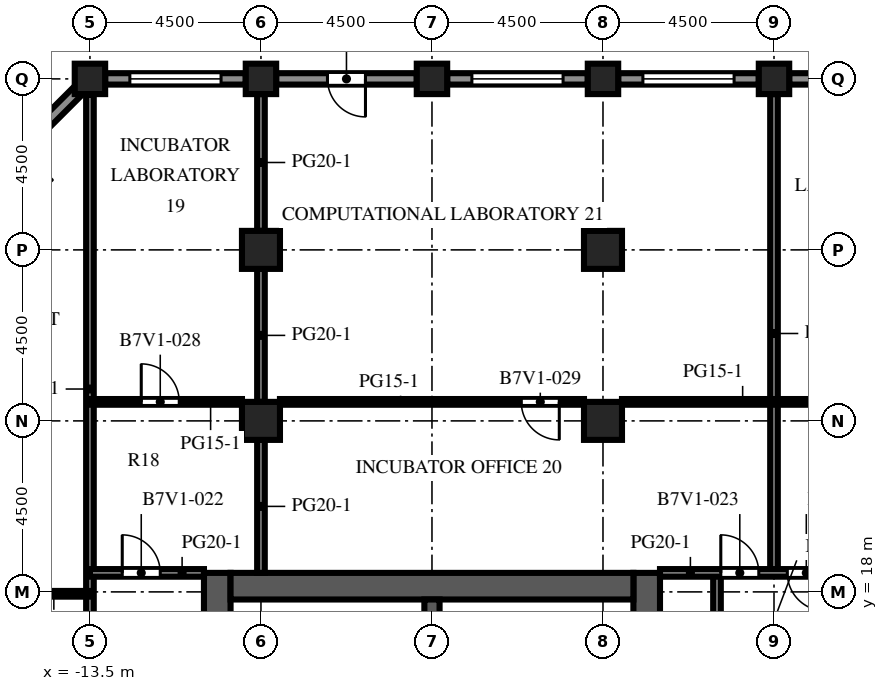
"""IFC4 building model, lengths in metres.
Left out: names, types, materials, properties, quantities, classifications, styles, units other than length and angle.
Written with IfcOpenShell. Run it as: python <this file> out.ifc"""

import sys

from ifc_helpers import new_model, si_unit, direction, frame, frame_2d, origin, origin_2d, place, context, subcontext, project, spatial, rectangle, extrude, element, fill, save


model = new_model("IFC4")
c1 = context("Model", 3, precision=1e-05, world=origin(), true_north=direction((0.0, 1.0)))
c2 = subcontext(c1, "Body", "Model", "MODEL_VIEW")
j1 = project(units=[si_unit("LENGTHUNIT", "METRE"), si_unit("PLANEANGLEUNIT", "RADIAN")], contexts=[c1])
p1 = place(None, origin())
s1 = spatial("IfcSite", under=j1, at=p1, CompositionType="ELEMENT")
p2 = place(p1, origin())
s2 = spatial("IfcBuilding", under=s1, at=p2, CompositionType="ELEMENT")
p3 = place(p2, frame((0.0, 0.0, 252.1)))
s3 = spatial("IfcBuildingStorey", under=s2, at=p3, CompositionType="ELEMENT", Elevation=252.1)
for number, where, z_axis, x_axis in (
    (1, (-13.5, 31.5, 0.0), (0.0, 0.0, 1.0), (1.0, 0.0, 0.0)),
    (2, (-9.0, 31.5, 0.0), (0.0, 0.0, 1.0), (1.0, 0.0, 0.0)),
    (3, (-4.5, 31.5, 0.0), (0.0, 0.0, 1.0), (1.0, 0.0, 0.0)),
    (4, (0.0, 31.5, 0.0), (0.0, 0.0, 1.0), (1.0, 0.0, 0.0)),
    (5, (4.5, 31.5, 0.0), (0.0, 0.0, 1.0), (1.0, 0.0, 0.0)),
):
    element("IfcColumn", number, at=place(p3, frame(where, z_axis=z_axis, x_axis=x_axis)), inside=s3, PredefinedType="COLUMN", context=c2, shape_type="SweptSolid", body=[
        extrude(rectangle(XDim=0.8, YDim=0.8, at=origin_2d()), origin(), (0.0, 0.0, 1.0), 4.1),
    ])
for number, where, z_axis, x_axis in (
    (6, (-9.0, 22.5, 0.0), (0.0, 0.0, 1.0), (1.0, 0.0, 0.0)),
    (7, (-9.0, 27.0, 0.0), (0.0, 0.0, 1.0), (1.0, 0.0, 0.0)),
    (8, (0.0, 22.5, 0.0), (0.0, 0.0, 1.0), (1.0, 0.0, 0.0)),
    (9, (0.0, 27.0, 0.0), (0.0, 0.0, 1.0), (1.0, 0.0, 0.0)),
):
    element("IfcColumn", number, at=place(p3, frame(where, z_axis=z_axis, x_axis=x_axis)), inside=s3, PredefinedType="COLUMN", context=c2, shape_type="SweptSolid", body=[
        extrude(rectangle(XDim=1.0, YDim=1.0, at=origin_2d()), origin(), (0.0, 0.0, 1.0), 4.1),
    ])
p4 = place(p3, frame((-10.15, -9.0, 0.0), z_axis=(0.0, 0.0, 1.0), x_axis=(0.0, 1.0, 0.0)))
e10 = element("IfcWall", 10, at=p4, inside=s3, PredefinedType="SHEAR", context=c2, shape_type="SweptSolid", body=[
    extrude(rectangle(XDim=27.5, YDim=0.7, at=frame_2d((13.75, 0.0))), origin(), (0.0, 0.0, 1.0), 4.1),
])
p5 = place(p4, frame((12.55, 0.0, 0.0)))
e11 = element("IfcOpeningElement", 11, at=p5, cuts=e10, PredefinedType="OPENING", context=c2, shape_type="SweptSolid", body=[
    extrude(rectangle(XDim=2.4, YDim=2.4, at=frame_2d((1.2, 1.2))), frame((0.0, 0.36, 0.0), z_axis=(0.0, -1.0, 0.0), x_axis=(1.0, 0.0, 0.0)), (0.0, 0.0, 1.0), 0.72),
])
p6 = place(p4, frame((6.825, 0.0, 0.0)))
e12 = element("IfcOpeningElement", 12, at=p6, cuts=e10, PredefinedType="OPENING", context=c2, shape_type="SweptSolid", body=[
    extrude(rectangle(XDim=1.2, YDim=2.1, at=frame_2d((0.6, 1.05))), frame((0.0, 0.36, 0.0), z_axis=(0.0, -1.0, 0.0), x_axis=(1.0, 0.0, 0.0)), (0.0, 0.0, 1.0), 0.72),
])
p7 = place(p4, frame((19.475, 0.0, 0.0)))
e13 = element("IfcOpeningElement", 13, at=p7, cuts=e10, PredefinedType="OPENING", context=c2, shape_type="SweptSolid", body=[
    extrude(rectangle(XDim=1.2, YDim=2.1, at=frame_2d((0.6, 1.05))), frame((0.0, 0.36, 0.0), z_axis=(0.0, -1.0, 0.0), x_axis=(1.0, 0.0, 0.0)), (0.0, 0.0, 1.0), 0.72),
])
p8 = place(p3, frame((1.15, -9.0, 0.0), z_axis=(0.0, 0.0, 1.0), x_axis=(0.0, 1.0, 0.0)))
e14 = element("IfcWall", 14, at=p8, inside=s3, PredefinedType="SHEAR", context=c2, shape_type="SweptSolid", body=[
    extrude(rectangle(XDim=27.5, YDim=0.7, at=frame_2d((13.75, 0.0))), origin(), (0.0, 0.0, 1.0), 4.1),
])
p9 = place(p8, frame((12.55, 0.0, 0.0)))
e15 = element("IfcOpeningElement", 15, at=p9, cuts=e14, PredefinedType="OPENING", context=c2, shape_type="SweptSolid", body=[
    extrude(rectangle(XDim=2.4, YDim=2.4, at=frame_2d((1.2, 1.2))), frame((0.0, 0.36, 0.0), z_axis=(0.0, -1.0, 0.0), x_axis=(1.0, 0.0, 0.0)), (0.0, 0.0, 1.0), 0.72),
])
p10 = place(p8, frame((3.9, 0.0, 0.0)))
e16 = element("IfcOpeningElement", 16, at=p10, cuts=e14, PredefinedType="OPENING", context=c2, shape_type="SweptSolid", body=[
    extrude(rectangle(XDim=1.2, YDim=2.1, at=frame_2d((0.6, 1.05))), frame((0.0, 0.36, 0.0), z_axis=(0.0, -1.0, 0.0), x_axis=(1.0, 0.0, 0.0)), (0.0, 0.0, 1.0), 0.72),
])
p11 = place(p8, frame((22.4, 0.0, 0.0)))
e17 = element("IfcOpeningElement", 17, at=p11, cuts=e14, PredefinedType="OPENING", context=c2, shape_type="SweptSolid", body=[
    extrude(rectangle(XDim=1.2, YDim=2.1, at=frame_2d((0.6, 1.05))), frame((0.0, 0.36, 0.0), z_axis=(0.0, -1.0, 0.0), x_axis=(1.0, 0.0, 0.0)), (0.0, 0.0, 1.0), 0.72),
])
p12 = place(p3, frame((-9.8, 18.15, 0.0), z_axis=(0.0, 0.0, 1.0), x_axis=(1.0, 0.0, 0.0)))
e18 = element("IfcWall", 18, at=p12, inside=s3, PredefinedType="SHEAR", context=c2, shape_type="SweptSolid", body=[
    extrude(rectangle(XDim=10.6, YDim=0.7, at=frame_2d((5.3, 0.0))), origin(), (0.0, 0.0, 1.0), 4.1),
])
p13 = place(p3, frame((-4.5, 10.2, 0.0), z_axis=(0.0, 0.0, 1.0), x_axis=(0.0, 1.0, 0.0)))
e19 = element("IfcWall", 19, at=p13, inside=s3, PredefinedType="SHEAR", context=c2, shape_type="SweptSolid", body=[
    extrude(rectangle(XDim=7.6, YDim=0.4, at=frame_2d((3.8, 0.0))), origin(), (0.0, 0.0, 1.0), 4.1),
])
p14 = place(p3, frame((4.9, 31.5, 0.0), z_axis=(0.0, 0.0, 1.0), x_axis=(1.0, 0.0, 0.0)))
e20 = element("IfcWall", 20, at=p14, inside=s3, PredefinedType="SOLIDWALL", context=c2, shape_type="SweptSolid", body=[
    extrude(rectangle(XDim=3.7, YDim=0.3, at=frame_2d((1.85, 0.0))), origin(), (0.0, 0.0, 1.0), 2.85),
])
p15 = place(p14, frame((0.65, 0.0, 0.8)))
e21 = element("IfcOpeningElement", 21, at=p15, cuts=e20, PredefinedType="OPENING", context=c2, shape_type="SweptSolid", body=[
    extrude(rectangle(XDim=2.4, YDim=1.7, at=frame_2d((1.2, 0.85))), frame((0.0, 0.16, 0.0), z_axis=(0.0, -1.0, 0.0), x_axis=(1.0, 0.0, 0.0)), (0.0, 0.0, 1.0), 0.32),
])
p16 = place(p3, frame((0.4, 31.5, 0.0), z_axis=(0.0, 0.0, 1.0), x_axis=(1.0, 0.0, 0.0)))
e22 = element("IfcWall", 22, at=p16, inside=s3, PredefinedType="SOLIDWALL", context=c2, shape_type="SweptSolid", body=[
    extrude(rectangle(XDim=3.7, YDim=0.3, at=frame_2d((1.85, 0.0))), origin(), (0.0, 0.0, 1.0), 2.85),
])
p17 = place(p16, frame((0.65, 0.0, 0.8)))
e23 = element("IfcOpeningElement", 23, at=p17, cuts=e22, PredefinedType="OPENING", context=c2, shape_type="SweptSolid", body=[
    extrude(rectangle(XDim=2.4, YDim=1.7, at=frame_2d((1.2, 0.85))), frame((0.0, 0.16, 0.0), z_axis=(0.0, -1.0, 0.0), x_axis=(1.0, 0.0, 0.0)), (0.0, 0.0, 1.0), 0.32),
])
p18 = place(p3, frame((-4.1, 31.5, 0.0), z_axis=(0.0, 0.0, 1.0), x_axis=(1.0, 0.0, 0.0)))
e24 = element("IfcWall", 24, at=p18, inside=s3, PredefinedType="SOLIDWALL", context=c2, shape_type="SweptSolid", body=[
    extrude(rectangle(XDim=3.7, YDim=0.3, at=frame_2d((1.85, 0.0))), origin(), (0.0, 0.0, 1.0), 2.85),
])
p19 = place(p18, frame((0.65, 0.0, 0.8)))
e25 = element("IfcOpeningElement", 25, at=p19, cuts=e24, PredefinedType="OPENING", context=c2, shape_type="SweptSolid", body=[
    extrude(rectangle(XDim=2.4, YDim=1.7, at=frame_2d((1.2, 0.85))), frame((0.0, 0.16, 0.0), z_axis=(0.0, -1.0, 0.0), x_axis=(1.0, 0.0, 0.0)), (0.0, 0.0, 1.0), 0.32),
])
p20 = place(p3, frame((-8.6, 31.5, 0.0), z_axis=(0.0, 0.0, 1.0), x_axis=(1.0, 0.0, 0.0)))
e26 = element("IfcWall", 26, at=p20, inside=s3, PredefinedType="SOLIDWALL", context=c2, shape_type="SweptSolid", body=[
    extrude(rectangle(XDim=3.7, YDim=0.3, at=frame_2d((1.85, 0.0))), origin(), (0.0, 0.0, 1.0), 2.85),
])
p21 = place(p20, frame((1.35, 0.0, 0.0)))
e27 = element("IfcOpeningElement", 27, at=p21, cuts=e26, PredefinedType="OPENING", context=c2, shape_type="SweptSolid", body=[
    extrude(rectangle(XDim=1.0, YDim=2.2, at=frame_2d((0.5, 1.1))), frame((0.0, 0.16, 0.0), z_axis=(0.0, -1.0, 0.0), x_axis=(1.0, 0.0, 0.0)), (0.0, 0.0, 1.0), 0.32),
])
p22 = place(p3, frame((-13.1, 31.5, 0.0), z_axis=(0.0, 0.0, 1.0), x_axis=(1.0, 0.0, 0.0)))
e28 = element("IfcWall", 28, at=p22, inside=s3, PredefinedType="SOLIDWALL", context=c2, shape_type="SweptSolid", body=[
    extrude(rectangle(XDim=3.7, YDim=0.3, at=frame_2d((1.85, 0.0))), origin(), (0.0, 0.0, 1.0), 2.85),
])
p23 = place(p22, frame((0.65, 0.0, 0.8)))
e29 = element("IfcOpeningElement", 29, at=p23, cuts=e28, PredefinedType="OPENING", context=c2, shape_type="SweptSolid", body=[
    extrude(rectangle(XDim=2.4, YDim=1.7, at=frame_2d((1.2, 0.85))), frame((0.0, 0.16, 0.0), z_axis=(0.0, -1.0, 0.0), x_axis=(1.0, 0.0, 0.0)), (0.0, 0.0, 1.0), 0.32),
])
p24 = place(p3, frame((-17.706, 27.294, 0.0), z_axis=(0.0, 0.0, 1.0), x_axis=(0.707106781187, 0.707106781187, 0.0)))
e30 = element("IfcWall", 30, at=p24, inside=s3, PredefinedType="SOLIDWALL", context=c2, shape_type="SweptSolid", body=[
    extrude(rectangle(XDim=5.532, YDim=0.3, at=frame_2d((2.766, 0.0))), origin(), (0.0, 0.0, 1.0), 2.85),
])
p25 = place(p24, frame((2.166, 0.0, 0.0)))
e31 = element("IfcOpeningElement", 31, at=p25, cuts=e30, PredefinedType="OPENING", context=c2, shape_type="SweptSolid", body=[
    extrude(rectangle(XDim=1.2, YDim=2.2, at=frame_2d((0.6, 1.1))), frame((0.0, 0.16, 0.0), z_axis=(0.0, -1.0, 0.0), x_axis=(1.0, 0.0, 0.0)), (0.0, 0.0, 1.0), 0.32),
])
p26 = place(p3, frame((-0.6, 14.912, 0.0), z_axis=(0.0, 0.0, 1.0), x_axis=(0.0, 1.0, 0.0)))
e32 = element("IfcWall", 32, at=p26, inside=s3, PredefinedType="PARTITIONING", context=c2, shape_type="SweptSolid", body=[
    extrude(rectangle(XDim=2.888, YDim=0.1, at=frame_2d((1.444, 0.0))), origin(), (0.0, 0.0, 1.0), 3.65),
])
p27 = place(p26, frame((0.944, 0.0, 0.0)))
e33 = element("IfcOpeningElement", 33, at=p27, cuts=e32, PredefinedType="OPENING", context=c2, shape_type="SweptSolid", body=[
    extrude(rectangle(XDim=1.0, YDim=2.1, at=frame_2d((0.5, 1.05))), frame((0.0, 0.06, 0.0), z_axis=(0.0, -1.0, 0.0), x_axis=(1.0, 0.0, 0.0)), (0.0, 0.0, 1.0), 0.12),
])
p28 = place(p3, frame((-13.5, 6.25, 0.0), z_axis=(0.0, 0.0, 1.0), x_axis=(0.0, 1.0, 0.0)))
e34 = element("IfcWall", 34, at=p28, inside=s3, PredefinedType="PARTITIONING", context=c2, shape_type="SweptSolid", body=[
    extrude(rectangle(XDim=24.827, YDim=0.2, at=frame_2d((12.414, 0.0))), origin(), (0.0, 0.0, 1.0), 3.65),
])
p29 = place(p28, frame((8.35, 0.0, 0.0)))
e35 = element("IfcOpeningElement", 35, at=p29, cuts=e34, PredefinedType="OPENING", context=c2, shape_type="SweptSolid", body=[
    extrude(rectangle(XDim=1.0, YDim=2.1, at=frame_2d((0.5, 1.05))), frame((0.0, 0.11, 0.0), z_axis=(0.0, -1.0, 0.0), x_axis=(1.0, 0.0, 0.0)), (0.0, 0.0, 1.0), 0.22),
])
for number, where, z_axis, x_axis in (
    (36, (-9.0, 18.5, 0.0), (0.0, 0.0, 1.0), (0.0, 1.0, 0.0)),
    (37, (-9.0, 23.0, 0.0), (0.0, 0.0, 1.0), (0.0, 1.0, 0.0)),
):
    element("IfcWall", number, at=place(p3, frame(where, z_axis=z_axis, x_axis=x_axis)), inside=s3, PredefinedType="PARTITIONING", context=c2, shape_type="SweptSolid", body=[
        extrude(rectangle(XDim=3.5, YDim=0.2, at=frame_2d((1.75, 0.0))), origin(), (0.0, 0.0, 1.0), 3.65),
    ])
p30 = place(p3, frame((-9.0, 27.5, 0.0), z_axis=(0.0, 0.0, 1.0), x_axis=(0.0, 1.0, 0.0)))
e38 = element("IfcWall", 38, at=p30, inside=s3, PredefinedType="PARTITIONING", context=c2, shape_type="SweptSolid", body=[
    extrude(rectangle(XDim=3.6, YDim=0.2, at=frame_2d((1.8, 0.0))), origin(), (0.0, 0.0, 1.0), 3.65),
])
p31 = place(p3, frame((3.0, 6.7, 0.0), z_axis=(0.0, 0.0, 1.0), x_axis=(0.0, 1.0, 0.0)))
e39 = element("IfcWall", 39, at=p31, inside=s3, PredefinedType="PARTITIONING", context=c2, shape_type="SweptSolid", body=[
    extrude(rectangle(XDim=11.8, YDim=0.2, at=frame_2d((5.9, 0.0))), origin(), (0.0, 0.0, 1.0), 3.65),
])
p32 = place(p31, frame((6.1, 0.0, 0.0)))
e40 = element("IfcOpeningElement", 40, at=p32, cuts=e39, PredefinedType="OPENING", context=c2, shape_type="SweptSolid", body=[
    extrude(rectangle(XDim=1.0, YDim=2.1, at=frame_2d((0.5, 1.05))), frame((0.0, 0.11, 0.0), z_axis=(0.0, -1.0, 0.0), x_axis=(1.0, 0.0, 0.0)), (0.0, 0.0, 1.0), 0.22),
])
p33 = place(p3, frame((4.5, 18.5, 0.0), z_axis=(0.0, 0.0, 1.0), x_axis=(0.0, 1.0, 0.0)))
e41 = element("IfcWall", 41, at=p33, inside=s3, PredefinedType="PARTITIONING", context=c2, shape_type="SweptSolid", body=[
    extrude(rectangle(XDim=12.6, YDim=0.2, at=frame_2d((6.3, 0.0))), origin(), (0.0, 0.0, 1.0), 3.65),
])
p34 = place(p3, frame((-17.6, 17.95, 0.0), z_axis=(0.0, 0.0, 1.0), x_axis=(1.0, 0.0, 0.0)))
e42 = element("IfcWall", 42, at=p34, inside=s3, PredefinedType="PARTITIONING", context=c2, shape_type="SweptSolid", body=[
    extrude(rectangle(XDim=4.1, YDim=0.15, at=frame_2d((2.05, 0.0))), origin(), (0.0, 0.0, 1.0), 3.65),
])
p35 = place(p34, frame((1.2, 0.0, 0.0)))
e43 = element("IfcOpeningElement", 43, at=p35, cuts=e42, PredefinedType="OPENING", context=c2, shape_type="SweptSolid", body=[
    extrude(rectangle(XDim=1.0, YDim=2.1, at=frame_2d((0.5, 1.05))), frame((0.0, 0.085, 0.0), z_axis=(0.0, -1.0, 0.0), x_axis=(1.0, 0.0, 0.0)), (0.0, 0.0, 1.0), 0.17),
])
p36 = place(p3, frame((-13.5, 18.5, 0.0), z_axis=(0.0, 0.0, 1.0), x_axis=(1.0, 0.0, 0.0)))
e44 = element("IfcWall", 44, at=p36, inside=s3, PredefinedType="PARTITIONING", context=c2, shape_type="SweptSolid", body=[
    extrude(rectangle(XDim=3.0, YDim=0.2, at=frame_2d((1.5, 0.0))), origin(), (0.0, 0.0, 1.0), 3.65),
])
p37 = place(p36, frame((0.85, 0.0, 0.0)))
e45 = element("IfcOpeningElement", 45, at=p37, cuts=e44, PredefinedType="OPENING", context=c2, shape_type="SweptSolid", body=[
    extrude(rectangle(XDim=1.0, YDim=2.1, at=frame_2d((0.5, 1.05))), frame((0.0, 0.11, 0.0), z_axis=(0.0, -1.0, 0.0), x_axis=(1.0, 0.0, 0.0)), (0.0, 0.0, 1.0), 0.22),
])
p38 = place(p3, frame((1.5, 18.5, 0.0), z_axis=(0.0, 0.0, 1.0), x_axis=(1.0, 0.0, 0.0)))
e46 = element("IfcWall", 46, at=p38, inside=s3, PredefinedType="PARTITIONING", context=c2, shape_type="SweptSolid", body=[
    extrude(rectangle(XDim=4.5, YDim=0.2, at=frame_2d((2.25, 0.0))), origin(), (0.0, 0.0, 1.0), 3.65),
])
p39 = place(p38, frame((1.6, 0.0, 0.0)))
e47 = element("IfcOpeningElement", 47, at=p39, cuts=e46, PredefinedType="OPENING", context=c2, shape_type="SweptSolid", body=[
    extrude(rectangle(XDim=1.0, YDim=2.1, at=frame_2d((0.5, 1.05))), frame((0.0, 0.11, 0.0), z_axis=(0.0, -1.0, 0.0), x_axis=(1.0, 0.0, 0.0)), (0.0, 0.0, 1.0), 0.22),
])
p40 = place(p38, frame((3.35, 0.0, 0.0)))
e48 = element("IfcOpeningElement", 48, at=p40, cuts=e46, PredefinedType="OPENING", context=c2, shape_type="SweptSolid", body=[
    extrude(rectangle(XDim=1.0, YDim=2.1, at=frame_2d((0.5, 1.05))), frame((0.0, 0.11, 0.0), z_axis=(0.0, -1.0, 0.0), x_axis=(1.0, 0.0, 0.0)), (0.0, 0.0, 1.0), 0.22),
])
p41 = place(p3, frame((-13.5, 23.0, 0.0), z_axis=(0.0, 0.0, 1.0), x_axis=(1.0, 0.0, 0.0)))
e49 = element("IfcWall", 49, at=p41, inside=s3, PredefinedType="PARTITIONING", context=c2, shape_type="SweptSolid", body=[
    extrude(rectangle(XDim=4.0, YDim=0.15, at=frame_2d((2.0, 0.0))), origin(), (0.0, 0.0, 1.0), 3.65),
])
p42 = place(p41, frame((1.35, 0.0, 0.0)))
e50 = element("IfcOpeningElement", 50, at=p42, cuts=e49, PredefinedType="OPENING", context=c2, shape_type="SweptSolid", body=[
    extrude(rectangle(XDim=1.0, YDim=2.1, at=frame_2d((0.5, 1.05))), frame((0.0, 0.085, 0.0), z_axis=(0.0, -1.0, 0.0), x_axis=(1.0, 0.0, 0.0)), (0.0, 0.0, 1.0), 0.17),
])
p43 = place(p3, frame((-8.5, 23.0, 0.0), z_axis=(0.0, 0.0, 1.0), x_axis=(1.0, 0.0, 0.0)))
e51 = element("IfcWall", 51, at=p43, inside=s3, PredefinedType="PARTITIONING", context=c2, shape_type="SweptSolid", body=[
    extrude(rectangle(XDim=8.0, YDim=0.15, at=frame_2d((4.0, 0.0))), origin(), (0.0, 0.0, 1.0), 3.65),
])
p44 = place(p43, frame((6.35, 0.0, 0.0)))
e52 = element("IfcOpeningElement", 52, at=p44, cuts=e51, PredefinedType="OPENING", context=c2, shape_type="SweptSolid", body=[
    extrude(rectangle(XDim=1.0, YDim=2.1, at=frame_2d((0.5, 1.05))), frame((0.0, 0.085, 0.0), z_axis=(0.0, -1.0, 0.0), x_axis=(1.0, 0.0, 0.0)), (0.0, 0.0, 1.0), 0.17),
])
p45 = place(p3, frame((0.5, 23.0, 0.0), z_axis=(0.0, 0.0, 1.0), x_axis=(1.0, 0.0, 0.0)))
e53 = element("IfcWall", 53, at=p45, inside=s3, PredefinedType="PARTITIONING", context=c2, shape_type="SweptSolid", body=[
    extrude(rectangle(XDim=8.0, YDim=0.15, at=frame_2d((4.0, 0.0))), origin(), (0.0, 0.0, 1.0), 3.65),
])
p46 = place(p45, frame((6.35, 0.0, 0.0)))
e54 = element("IfcOpeningElement", 54, at=p46, cuts=e53, PredefinedType="OPENING", context=c2, shape_type="SweptSolid", body=[
    extrude(rectangle(XDim=1.0, YDim=2.1, at=frame_2d((0.5, 1.05))), frame((0.0, 0.085, 0.0), z_axis=(0.0, -1.0, 0.0), x_axis=(1.0, 0.0, 0.0)), (0.0, 0.0, 1.0), 0.17),
])
p47 = place(p17, origin())
e55 = element("IfcWindow", 55, at=p47, inside=s3, PartitioningType="SINGLE_PANEL", PredefinedType="WINDOW", context=c2, shape_type="SweptSolid", body=[
    extrude(rectangle(XDim=2.4, YDim=1.7, at=frame_2d((1.2, 0.85))), frame((0.0, 0.03, 0.0), z_axis=(0.0, -1.0, 0.0), x_axis=(1.0, 0.0, 0.0)), (0.0, 0.0, 1.0), 0.06),
])
fill(e23, e55)
p48 = place(p19, origin())
e56 = element("IfcWindow", 56, at=p48, inside=s3, PartitioningType="SINGLE_PANEL", PredefinedType="WINDOW", context=c2, shape_type="SweptSolid", body=[
    extrude(rectangle(XDim=2.4, YDim=1.7, at=frame_2d((1.2, 0.85))), frame((0.0, 0.03, 0.0), z_axis=(0.0, -1.0, 0.0), x_axis=(1.0, 0.0, 0.0)), (0.0, 0.0, 1.0), 0.06),
])
fill(e25, e56)
p49 = place(p21, origin())
e57 = element("IfcDoor", 57, at=p49, inside=s3, OperationType="SINGLE_SWING_RIGHT", PredefinedType="DOOR", context=c2, shape_type="SweptSolid", body=[
    extrude(rectangle(XDim=1.0, YDim=2.2, at=frame_2d((0.5, 1.1))), frame((0.0, 0.025, 0.0), z_axis=(0.0, -1.0, 0.0), x_axis=(1.0, 0.0, 0.0)), (0.0, 0.0, 1.0), 0.05),
])
fill(e27, e57)
p50 = place(p23, origin())
e58 = element("IfcWindow", 58, at=p50, inside=s3, PartitioningType="SINGLE_PANEL", PredefinedType="WINDOW", context=c2, shape_type="SweptSolid", body=[
    extrude(rectangle(XDim=2.4, YDim=1.7, at=frame_2d((1.2, 0.85))), frame((0.0, 0.03, 0.0), z_axis=(0.0, -1.0, 0.0), x_axis=(1.0, 0.0, 0.0)), (0.0, 0.0, 1.0), 0.06),
])
fill(e29, e58)
p51 = place(p37, origin())
e59 = element("IfcDoor", 59, at=p51, inside=s3, OperationType="SINGLE_SWING_LEFT", PredefinedType="DOOR", context=c2, shape_type="SweptSolid", body=[
    extrude(rectangle(XDim=1.0, YDim=2.1, at=frame_2d((0.5, 1.05))), frame((0.0, 0.025, 0.0), z_axis=(0.0, -1.0, 0.0), x_axis=(1.0, 0.0, 0.0)), (0.0, 0.0, 1.0), 0.05),
])
fill(e45, e59)
p52 = place(p39, origin())
e60 = element("IfcDoor", 60, at=p52, inside=s3, OperationType="SINGLE_SWING_LEFT", PredefinedType="DOOR", context=c2, shape_type="SweptSolid", body=[
    extrude(rectangle(XDim=1.0, YDim=2.1, at=frame_2d((0.5, 1.05))), frame((0.0, 0.025, 0.0), z_axis=(0.0, -1.0, 0.0), x_axis=(1.0, 0.0, 0.0)), (0.0, 0.0, 1.0), 0.05),
])
fill(e47, e60)
p53 = place(p40, origin())
e61 = element("IfcDoor", 61, at=p53, inside=s3, OperationType="SINGLE_SWING_RIGHT", PredefinedType="DOOR", context=c2, shape_type="SweptSolid", body=[
    extrude(rectangle(XDim=1.0, YDim=2.1, at=frame_2d((0.5, 1.05))), frame((0.0, 0.025, 0.0), z_axis=(0.0, -1.0, 0.0), x_axis=(1.0, 0.0, 0.0)), (0.0, 0.0, 1.0), 0.05),
])
fill(e48, e61)
p54 = place(p42, origin())
e62 = element("IfcDoor", 62, at=p54, inside=s3, OperationType="SINGLE_SWING_LEFT", PredefinedType="DOOR", context=c2, shape_type="SweptSolid", body=[
    extrude(rectangle(XDim=1.0, YDim=2.1, at=frame_2d((0.5, 1.05))), frame((0.0, 0.025, 0.0), z_axis=(0.0, -1.0, 0.0), x_axis=(1.0, 0.0, 0.0)), (0.0, 0.0, 1.0), 0.05),
])
fill(e50, e62)
p55 = place(p44, origin())
e63 = element("IfcDoor", 63, at=p55, inside=s3, OperationType="SINGLE_SWING_RIGHT", PredefinedType="DOOR", context=c2, shape_type="SweptSolid", body=[
    extrude(rectangle(XDim=1.0, YDim=2.1, at=frame_2d((0.5, 1.05))), frame((0.0, 0.025, 0.0), z_axis=(0.0, -1.0, 0.0), x_axis=(1.0, 0.0, 0.0)), (0.0, 0.0, 1.0), 0.05),
])
fill(e52, e63)
save(model, sys.argv[1])
